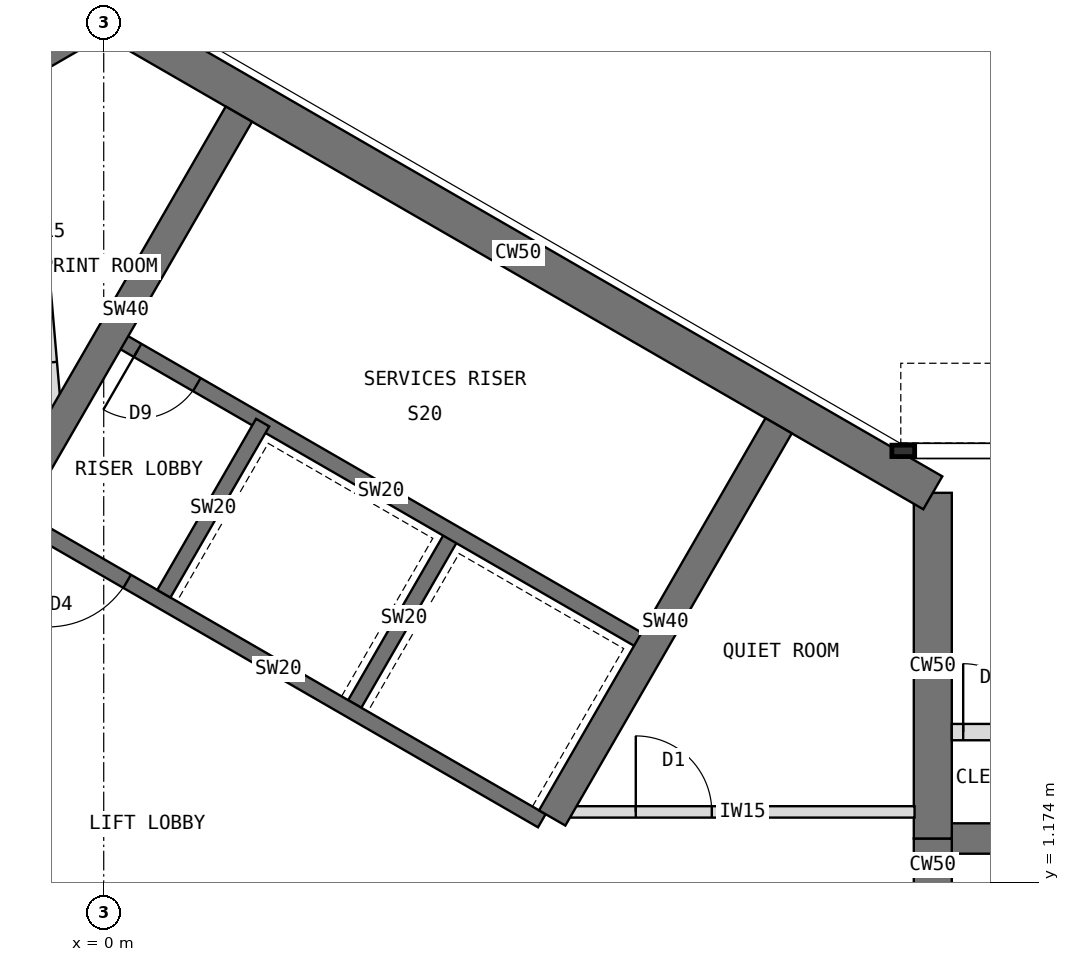
"""IFC4 building model, lengths in metres.
Left out: names, types, materials, properties, quantities, classifications, styles, units other than length and angle.
Written with IfcOpenShell. Run it as: python <this file> out.ifc"""

import sys

from ifc_helpers import new_model, si_unit, direction, frame, frame_2d, origin, place, context, subcontext, project, spatial, rectangle, extrude, element, fill, save


model = new_model("IFC4")
c1 = context("Model", 3, precision=1e-05, world=origin(), true_north=direction((0.0, 1.0)))
c2 = subcontext(c1, "Body", "Model", "MODEL_VIEW")
j1 = project(units=[si_unit("LENGTHUNIT", "METRE"), si_unit("PLANEANGLEUNIT", "RADIAN")], contexts=[c1])
p1 = place(None, origin())
s1 = spatial("IfcSite", under=j1, at=p1, CompositionType="ELEMENT")
p2 = place(p1, origin())
s2 = spatial("IfcBuilding", under=s1, at=p2, CompositionType="ELEMENT")
p3 = place(p2, frame((0.0, 0.0, 186.5)))
s3 = spatial("IfcBuildingStorey", under=s2, at=p3, CompositionType="ELEMENT", Elevation=186.5)
p4 = place(p3, frame((10.908, -1.75, 0.0), z_axis=(0.0, 0.0, 1.0), x_axis=(0.0, 1.0, 0.0)))
e1 = element("IfcWall", 1, at=p4, inside=s3, PredefinedType="SHEAR", context=c2, shape_type="SweptSolid", body=[
    extrude(rectangle(XDim=3.5, YDim=0.5, at=frame_2d((1.75, 0.0))), origin(), (0.0, 0.0, 1.0), 4.0),
])
p5 = place(p4, frame((0.85, 0.0, 0.0)))
e2 = element("IfcOpeningElement", 2, at=p5, cuts=e1, PredefinedType="OPENING", context=c2, shape_type="SweptSolid", body=[
    extrude(rectangle(XDim=1.8, YDim=2.1, at=frame_2d((0.9, 1.05))), frame((0.0, 0.26, 0.0), z_axis=(0.0, -1.0, 0.0), x_axis=(1.0, 0.0, 0.0)), (0.0, 0.0, 1.0), 0.52),
])
p6 = place(p3, frame((10.908, 1.75, 0.0), z_axis=(0.0, 0.0, 1.0), x_axis=(0.0, 1.0, 0.0)))
e3 = element("IfcWall", 3, at=p6, inside=s3, PredefinedType="SHEAR", context=c2, shape_type="SweptSolid", body=[
    extrude(rectangle(XDim=4.548, YDim=0.5, at=frame_2d((2.274, 0.0))), origin(), (0.0, 0.0, 1.0), 4.0),
])
p7 = place(p3, frame((10.908, 6.298, 0.0), z_axis=(0.0, 0.0, 1.0), x_axis=(-0.866021940709, 0.500005998175, 0.0)))
e4 = element("IfcWall", 4, at=p7, inside=s3, PredefinedType="SHEAR", context=c2, shape_type="SweptSolid", body=[
    extrude(rectangle(XDim=12.596, YDim=0.5, at=frame_2d((6.298, 0.0))), origin(), (0.0, 0.0, 1.0), 4.0),
])
p8 = place(p3, frame((0.0, 12.596, 0.0), z_axis=(0.0, 0.0, 1.0), x_axis=(-0.866011268655, -0.500024481964, 0.0)))
e5 = element("IfcWall", 5, at=p8, inside=s3, PredefinedType="SHEAR", context=c2, shape_type="SweptSolid", body=[
    extrude(rectangle(XDim=4.548, YDim=0.5, at=frame_2d((2.274, 0.0))), origin(), (0.0, 0.0, 1.0), 4.0),
])
p9 = place(p3, frame((10.908, 1.75, 0.0), z_axis=(0.0, 0.0, 1.0), x_axis=(1.0, 0.0, 0.0)))
e6 = element("IfcWall", 6, at=p9, inside=s3, PredefinedType="SHEAR", context=c2, shape_type="SweptSolid", body=[
    extrude(rectangle(XDim=2.592, YDim=0.4, at=frame_2d((1.296, 0.0))), origin(), (0.0, 0.0, 1.0), 4.0),
])
p10 = place(p3, frame((5.764, 1.984, 0.0), z_axis=(0.0, 0.0, 1.0), x_axis=(-0.866026010844, 0.49999894854, 0.0)))
e7 = element("IfcWall", 7, at=p10, inside=s3, PredefinedType="SHEAR", context=c2, shape_type="SweptSolid", body=[
    extrude(rectangle(XDim=8.0, YDim=0.2, at=frame_2d((4.0, 0.0))), origin(), (0.0, 0.0, 1.0), 4.0),
])
p11 = place(p10, frame((6.3, 0.0, 0.0)))
e8 = element("IfcOpeningElement", 8, at=p11, cuts=e7, PredefinedType="OPENING", context=c2, shape_type="SweptSolid", body=[
    extrude(rectangle(XDim=1.2, YDim=2.1, at=frame_2d((0.6, 1.05))), frame((0.0, 0.11, 0.0), z_axis=(0.0, -1.0, 0.0), x_axis=(1.0, 0.0, 0.0)), (0.0, 0.0, 1.0), 0.22),
])
for number, where, z_axis, x_axis in (
    (9, (3.303, 3.52, 0.0), (0.0, 0.0, 1.0), (0.5, 0.866, 0.0)),
    (10, (0.791, 4.97, 0.0), (0.0, 0.0, 1.0), (0.5, 0.866, 0.0)),
):
    element("IfcWall", number, at=place(p3, frame(where, z_axis=z_axis, x_axis=x_axis)), inside=s3, PredefinedType="SHEAR", context=c2, shape_type="SweptSolid", body=[
        extrude(rectangle(XDim=2.6, YDim=0.2, at=frame_2d((1.3, 0.0))), origin(), (0.0, 0.0, 1.0), 4.0),
    ])
p12 = place(p3, frame((7.114, 4.322, 0.0), z_axis=(0.0, 0.0, 1.0), x_axis=(-0.866026010844, 0.49999894854, 0.0)))
e11 = element("IfcWall", 11, at=p12, inside=s3, PredefinedType="SHEAR", context=c2, shape_type="SweptSolid", body=[
    extrude(rectangle(XDim=8.0, YDim=0.2, at=frame_2d((4.0, 0.0))), origin(), (0.0, 0.0, 1.0), 4.0),
])
p13 = place(p12, frame((6.8, 0.0, 0.0)))
e12 = element("IfcOpeningElement", 12, at=p13, cuts=e11, PredefinedType="OPENING", context=c2, shape_type="SweptSolid", body=[
    extrude(rectangle(XDim=0.9, YDim=2.1, at=frame_2d((0.45, 1.05))), frame((0.0, 0.11, 0.0), z_axis=(0.0, -1.0, 0.0), x_axis=(1.0, 0.0, 0.0)), (0.0, 0.0, 1.0), 0.22),
])
p14 = place(p3, frame((-1.201, 6.12, 0.0), z_axis=(0.0, 0.0, 1.0), x_axis=(0.500021575205, 0.866012946976, 0.0)))
e13 = element("IfcWall", 13, at=p14, inside=s3, PredefinedType="SHEAR", context=c2, shape_type="SweptSolid", body=[
    extrude(rectangle(XDim=5.958, YDim=0.4, at=frame_2d((2.979, 0.0))), origin(), (0.0, 0.0, 1.0), 4.0),
])
p15 = place(p3, frame((5.901, 2.02, 0.0), z_axis=(0.0, 0.0, 1.0), x_axis=(0.500003832394, 0.86602319114, 0.0)))
e14 = element("IfcWall", 14, at=p15, inside=s3, PredefinedType="SHEAR", context=c2, shape_type="SweptSolid", body=[
    extrude(rectangle(XDim=5.958, YDim=0.4, at=frame_2d((2.979, 0.0))), origin(), (0.0, 0.0, 1.0), 4.0),
])
p16 = place(p3, frame((11.158, 3.15, 0.0), z_axis=(0.0, 0.0, 1.0), x_axis=(1.0, 0.0, 0.0)))
e15 = element("IfcWall", 15, at=p16, inside=s3, PredefinedType="PARTITIONING", context=c2, shape_type="SweptSolid", body=[
    extrude(rectangle(XDim=2.4, YDim=0.215, at=frame_2d((1.2, 0.0))), origin(), (0.0, 0.0, 1.0), 3.8),
])
p17 = place(p16, frame((0.15, 0.0, 0.0)))
e16 = element("IfcOpeningElement", 16, at=p17, cuts=e15, PredefinedType="OPENING", context=c2, shape_type="SweptSolid", body=[
    extrude(rectangle(XDim=0.9, YDim=2.1, at=frame_2d((0.45, 1.05))), frame((0.0, 0.117, 0.0), z_axis=(0.0, -1.0, 0.0), x_axis=(1.0, 0.0, 0.0)), (0.0, 0.0, 1.0), 0.235),
])
p18 = place(p3, frame((6.143, 2.1, 0.0), z_axis=(0.0, 0.0, 1.0), x_axis=(1.0, 0.0, 0.0)))
e17 = element("IfcWall", 17, at=p18, inside=s3, PredefinedType="PARTITIONING", context=c2, shape_type="SweptSolid", body=[
    extrude(rectangle(XDim=4.526, YDim=0.15, at=frame_2d((2.263, 0.0))), origin(), (0.0, 0.0, 1.0), 3.8),
])
p19 = place(p18, frame((0.858, 0.0, 0.0)))
e18 = element("IfcOpeningElement", 18, at=p19, cuts=e17, PredefinedType="OPENING", context=c2, shape_type="SweptSolid", body=[
    extrude(rectangle(XDim=1.0, YDim=2.1, at=frame_2d((0.5, 1.05))), frame((0.0, 0.085, 0.0), z_axis=(0.0, -1.0, 0.0), x_axis=(1.0, 0.0, 0.0)), (0.0, 0.0, 1.0), 0.17),
])
p20 = place(p3, frame((-0.614, 7.136, 0.0), z_axis=(0.0, 0.0, 1.0), x_axis=(-0.085774026317, 0.996314617181, 0.0)))
e19 = element("IfcWall", 19, at=p20, inside=s3, PredefinedType="PARTITIONING", context=c2, shape_type="SweptSolid", body=[
    extrude(rectangle(XDim=4.605, YDim=0.15, at=frame_2d((2.303, 0.0))), origin(), (0.0, 0.0, 1.0), 3.8),
])
p21 = place(p20, frame((0.882, 0.0, 0.0)))
e20 = element("IfcOpeningElement", 20, at=p21, cuts=e19, PredefinedType="OPENING", context=c2, shape_type="SweptSolid", body=[
    extrude(rectangle(XDim=1.0, YDim=2.1, at=frame_2d((0.5, 1.05))), frame((0.0, 0.085, 0.0), z_axis=(0.0, -1.0, 0.0), x_axis=(1.0, 0.0, 0.0)), (0.0, 0.0, 1.0), 0.17),
])
p22 = place(p11, origin())
e21 = element("IfcDoor", 21, at=p22, inside=s3, OperationType="SINGLE_SWING_RIGHT", PredefinedType="DOOR", context=c2, shape_type="SweptSolid", body=[
    extrude(rectangle(XDim=1.2, YDim=2.1, at=frame_2d((0.6, 1.05))), frame((0.0, 0.025, 0.0), z_axis=(0.0, -1.0, 0.0), x_axis=(1.0, 0.0, 0.0)), (0.0, 0.0, 1.0), 0.05),
])
fill(e8, e21)
p23 = place(p13, origin())
e22 = element("IfcDoor", 22, at=p23, inside=s3, OperationType="SINGLE_SWING_RIGHT", PredefinedType="DOOR", context=c2, shape_type="SweptSolid", body=[
    extrude(rectangle(XDim=0.9, YDim=2.1, at=frame_2d((0.45, 1.05))), frame((0.0, 0.025, 0.0), z_axis=(0.0, -1.0, 0.0), x_axis=(1.0, 0.0, 0.0)), (0.0, 0.0, 1.0), 0.05),
])
fill(e12, e22)
p24 = place(p17, origin())
e23 = element("IfcDoor", 23, at=p24, inside=s3, OperationType="SINGLE_SWING_LEFT", PredefinedType="DOOR", context=c2, shape_type="SweptSolid", body=[
    extrude(rectangle(XDim=0.9, YDim=2.1, at=frame_2d((0.45, 1.05))), frame((0.0, 0.025, 0.0), z_axis=(0.0, -1.0, 0.0), x_axis=(1.0, 0.0, 0.0)), (0.0, 0.0, 1.0), 0.05),
])
fill(e16, e23)
p25 = place(p19, origin())
e24 = element("IfcDoor", 24, at=p25, inside=s3, OperationType="SINGLE_SWING_LEFT", PredefinedType="DOOR", context=c2, shape_type="SweptSolid", body=[
    extrude(rectangle(XDim=1.0, YDim=2.1, at=frame_2d((0.5, 1.05))), frame((0.0, 0.025, 0.0), z_axis=(0.0, -1.0, 0.0), x_axis=(1.0, 0.0, 0.0)), (0.0, 0.0, 1.0), 0.05),
])
fill(e18, e24)
p26 = place(p21, origin())
e25 = element("IfcDoor", 25, at=p26, inside=s3, OperationType="SINGLE_SWING_LEFT", PredefinedType="DOOR", context=c2, shape_type="SweptSolid", body=[
    extrude(rectangle(XDim=1.0, YDim=2.1, at=frame_2d((0.5, 1.05))), frame((0.0, 0.025, 0.0), z_axis=(0.0, -1.0, 0.0), x_axis=(1.0, 0.0, 0.0)), (0.0, 0.0, 1.0), 0.05),
])
fill(e20, e25)
save(model, sys.argv[1])
